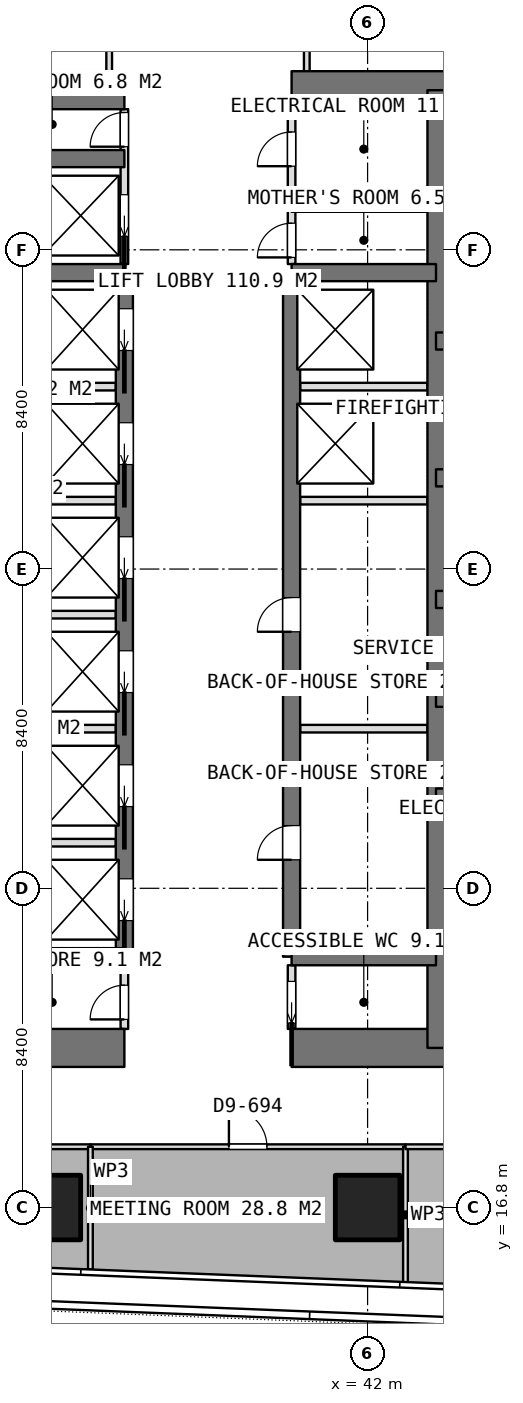
"""IFC4 building model, lengths in metres.
Left out: names, types, materials, properties, quantities, classifications, styles, units other than length and angle.
Written with IfcOpenShell. Run it as: python <this file> out.ifc"""

import sys

from ifc_helpers import new_model, si_unit, direction, frame, frame_2d, origin, origin_2d, place, context, subcontext, project, spatial, rectangle, extrude, element, fill, save


model = new_model("IFC4")
c1 = context("Model", 3, precision=1e-05, world=origin(), true_north=direction((0.0, 1.0)))
c2 = subcontext(c1, "Body", "Model", "MODEL_VIEW")
j1 = project(units=[si_unit("LENGTHUNIT", "METRE"), si_unit("PLANEANGLEUNIT", "RADIAN")], contexts=[c1])
p1 = place(None, origin())
s1 = spatial("IfcSite", under=j1, at=p1, CompositionType="ELEMENT")
p2 = place(p1, origin())
s2 = spatial("IfcBuilding", under=s1, at=p2, CompositionType="ELEMENT")
p3 = place(p2, frame((0.0, 0.0, 180.2)))
s3 = spatial("IfcBuildingStorey", under=s2, at=p3, CompositionType="ELEMENT", Elevation=180.2)
p4 = place(p3, frame((25.2, 21.0, 0.0), z_axis=(0.0, 0.0, 1.0), x_axis=(1.0, 0.0, 0.0)))
e1 = element("IfcWall", 1, at=p4, inside=s3, PredefinedType="SHEAR", context=c2, shape_type="SweptSolid", body=[
    extrude(rectangle(XDim=10.4, YDim=1.0, at=frame_2d((5.2, 0.0))), origin(), (0.0, 0.0, 1.0), 3.75),
])
p5 = place(p3, frame((40.0, 21.0, 0.0), z_axis=(0.0, 0.0, 1.0), x_axis=(1.0, 0.0, 0.0)))
e2 = element("IfcWall", 2, at=p5, inside=s3, PredefinedType="SHEAR", context=c2, shape_type="SweptSolid", body=[
    extrude(rectangle(XDim=10.4, YDim=1.0, at=frame_2d((5.2, 0.0))), origin(), (0.0, 0.0, 1.0), 3.75),
])
p6 = place(p3, frame((25.2, 46.2, 0.0), z_axis=(0.0, 0.0, 1.0), x_axis=(1.0, 0.0, 0.0)))
e3 = element("IfcWall", 3, at=p6, inside=s3, PredefinedType="SHEAR", context=c2, shape_type="SweptSolid", body=[
    extrude(rectangle(XDim=10.4, YDim=1.0, at=frame_2d((5.2, 0.0))), origin(), (0.0, 0.0, 1.0), 3.75),
])
p7 = place(p3, frame((40.0, 46.2, 0.0), z_axis=(0.0, 0.0, 1.0), x_axis=(1.0, 0.0, 0.0)))
e4 = element("IfcWall", 4, at=p7, inside=s3, PredefinedType="SHEAR", context=c2, shape_type="SweptSolid", body=[
    extrude(rectangle(XDim=10.4, YDim=1.0, at=frame_2d((5.2, 0.0))), origin(), (0.0, 0.0, 1.0), 3.75),
])
p8 = place(p3, frame((43.8, 21.0, 0.0), z_axis=(0.0, 0.0, 1.0), x_axis=(0.0, 1.0, 0.0)))
e5 = element("IfcWall", 5, at=p8, inside=s3, PredefinedType="SHEAR", context=c2, shape_type="SweptSolid", body=[
    extrude(rectangle(XDim=25.2, YDim=0.45, at=frame_2d((12.6, 0.0))), origin(), (0.0, 0.0, 1.0), 3.75),
])
p9 = place(p3, frame((35.6, 23.4, 0.0), z_axis=(0.0, 0.0, 1.0), x_axis=(0.0, 1.0, 0.0)))
e6 = element("IfcWall", 6, at=p9, inside=s3, PredefinedType="SHEAR", context=c2, shape_type="SweptSolid", body=[
    extrude(rectangle(XDim=18.0, YDim=0.45, at=frame_2d((9.0, 0.0))), origin(), (0.0, 0.0, 1.0), 3.75),
])
p10 = place(p9, frame((0.95, 0.0, 0.0)))
e7 = element("IfcOpeningElement", 7, at=p10, cuts=e6, PredefinedType="OPENING", context=c2, shape_type="SweptSolid", body=[
    extrude(rectangle(XDim=1.1, YDim=2.1, at=frame_2d((0.55, 1.05))), frame((0.0, 0.235, 0.0), z_axis=(0.0, -1.0, 0.0), x_axis=(1.0, 0.0, 0.0)), (0.0, 0.0, 1.0), 0.47),
])
p11 = place(p9, frame((3.95, 0.0, 0.0)))
e8 = element("IfcOpeningElement", 8, at=p11, cuts=e6, PredefinedType="OPENING", context=c2, shape_type="SweptSolid", body=[
    extrude(rectangle(XDim=1.1, YDim=2.1, at=frame_2d((0.55, 1.05))), frame((0.0, 0.235, 0.0), z_axis=(0.0, -1.0, 0.0), x_axis=(1.0, 0.0, 0.0)), (0.0, 0.0, 1.0), 0.47),
])
p12 = place(p9, frame((6.95, 0.0, 0.0)))
e9 = element("IfcOpeningElement", 9, at=p12, cuts=e6, PredefinedType="OPENING", context=c2, shape_type="SweptSolid", body=[
    extrude(rectangle(XDim=1.1, YDim=2.1, at=frame_2d((0.55, 1.05))), frame((0.0, 0.235, 0.0), z_axis=(0.0, -1.0, 0.0), x_axis=(1.0, 0.0, 0.0)), (0.0, 0.0, 1.0), 0.47),
])
p13 = place(p9, frame((9.95, 0.0, 0.0)))
e10 = element("IfcOpeningElement", 10, at=p13, cuts=e6, PredefinedType="OPENING", context=c2, shape_type="SweptSolid", body=[
    extrude(rectangle(XDim=1.1, YDim=2.1, at=frame_2d((0.55, 1.05))), frame((0.0, 0.235, 0.0), z_axis=(0.0, -1.0, 0.0), x_axis=(1.0, 0.0, 0.0)), (0.0, 0.0, 1.0), 0.47),
])
p14 = place(p9, frame((12.95, 0.0, 0.0)))
e11 = element("IfcOpeningElement", 11, at=p14, cuts=e6, PredefinedType="OPENING", context=c2, shape_type="SweptSolid", body=[
    extrude(rectangle(XDim=1.1, YDim=2.1, at=frame_2d((0.55, 1.05))), frame((0.0, 0.235, 0.0), z_axis=(0.0, -1.0, 0.0), x_axis=(1.0, 0.0, 0.0)), (0.0, 0.0, 1.0), 0.47),
])
p15 = place(p9, frame((15.95, 0.0, 0.0)))
e12 = element("IfcOpeningElement", 12, at=p15, cuts=e6, PredefinedType="OPENING", context=c2, shape_type="SweptSolid", body=[
    extrude(rectangle(XDim=1.1, YDim=2.1, at=frame_2d((0.55, 1.05))), frame((0.0, 0.235, 0.0), z_axis=(0.0, -1.0, 0.0), x_axis=(1.0, 0.0, 0.0)), (0.0, 0.0, 1.0), 0.47),
])
p16 = place(p3, frame((40.0, 23.4, 0.0), z_axis=(0.0, 0.0, 1.0), x_axis=(0.0, 1.0, 0.0)))
e13 = element("IfcWall", 13, at=p16, inside=s3, PredefinedType="SHEAR", context=c2, shape_type="SweptSolid", body=[
    extrude(rectangle(XDim=18.0, YDim=0.45, at=frame_2d((9.0, 0.0))), origin(), (0.0, 0.0, 1.0), 3.75),
])
p17 = place(p16, frame((2.55, 0.0, 0.0)))
e14 = element("IfcOpeningElement", 14, at=p17, cuts=e13, PredefinedType="OPENING", context=c2, shape_type="SweptSolid", body=[
    extrude(rectangle(XDim=0.9, YDim=2.1, at=frame_2d((0.45, 1.05))), frame((0.0, 0.235, 0.0), z_axis=(0.0, -1.0, 0.0), x_axis=(1.0, 0.0, 0.0)), (0.0, 0.0, 1.0), 0.47),
])
p18 = place(p16, frame((8.55, 0.0, 0.0)))
e15 = element("IfcOpeningElement", 15, at=p18, cuts=e13, PredefinedType="OPENING", context=c2, shape_type="SweptSolid", body=[
    extrude(rectangle(XDim=0.9, YDim=2.1, at=frame_2d((0.45, 1.05))), frame((0.0, 0.235, 0.0), z_axis=(0.0, -1.0, 0.0), x_axis=(1.0, 0.0, 0.0)), (0.0, 0.0, 1.0), 0.47),
])
for number, where, z_axis, x_axis in (
    (16, (31.8, 23.4, 0.0), (0.0, 0.0, 1.0), (1.0, 0.0, 0.0)),
    (17, (31.8, 41.4, 0.0), (0.0, 0.0, 1.0), (1.0, 0.0, 0.0)),
    (18, (31.8, 44.4, 0.0), (0.0, 0.0, 1.0), (1.0, 0.0, 0.0)),
    (19, (40.0, 23.4, 0.0), (0.0, 0.0, 1.0), (1.0, 0.0, 0.0)),
    (20, (40.0, 41.4, 0.0), (0.0, 0.0, 1.0), (1.0, 0.0, 0.0)),
):
    element("IfcWall", number, at=place(p3, frame(where, z_axis=z_axis, x_axis=x_axis)), inside=s3, PredefinedType="SHEAR", context=c2, shape_type="SweptSolid", body=[
        extrude(rectangle(XDim=3.8, YDim=0.45, at=frame_2d((1.9, 0.0))), origin(), (0.0, 0.0, 1.0), 3.75),
    ])
for number, where, z_axis, x_axis in (
    (21, (43.8, 27.6, 0.0), (0.0, 0.0, 1.0), (1.0, 0.0, 0.0)),
    (22, (43.8, 30.2, 0.0), (0.0, 0.0, 1.0), (1.0, 0.0, 0.0)),
    (23, (43.8, 32.8, 0.0), (0.0, 0.0, 1.0), (1.0, 0.0, 0.0)),
):
    element("IfcWall", number, at=place(p3, frame(where, z_axis=z_axis, x_axis=x_axis)), inside=s3, PredefinedType="SHEAR", context=c2, shape_type="SweptSolid", body=[
        extrude(rectangle(XDim=6.6, YDim=0.45, at=frame_2d((3.3, 0.0))), origin(), (0.0, 0.0, 1.0), 3.75),
    ])
p19 = place(p3, frame((43.8, 36.0, 0.0), z_axis=(0.0, 0.0, 1.0), x_axis=(1.0, 0.0, 0.0)))
e24 = element("IfcWall", 24, at=p19, inside=s3, PredefinedType="SHEAR", context=c2, shape_type="SweptSolid", body=[
    extrude(rectangle(XDim=6.6, YDim=0.45, at=frame_2d((3.3, 0.0))), origin(), (0.0, 0.0, 1.0), 3.75),
])
p20 = place(p19, frame((2.65, 0.0, 0.0)))
e25 = element("IfcOpeningElement", 25, at=p20, cuts=e24, PredefinedType="OPENING", context=c2, shape_type="SweptSolid", body=[
    extrude(rectangle(XDim=1.3, YDim=2.1, at=frame_2d((0.65, 1.05))), frame((0.0, 0.235, 0.0), z_axis=(0.0, -1.0, 0.0), x_axis=(1.0, 0.0, 0.0)), (0.0, 0.0, 1.0), 0.47),
])
p21 = place(p3, frame((43.8, 39.6, 0.0), z_axis=(0.0, 0.0, 1.0), x_axis=(1.0, 0.0, 0.0)))
e26 = element("IfcWall", 26, at=p21, inside=s3, PredefinedType="SHEAR", context=c2, shape_type="SweptSolid", body=[
    extrude(rectangle(XDim=6.6, YDim=0.45, at=frame_2d((3.3, 0.0))), origin(), (0.0, 0.0, 1.0), 3.75),
])
p22 = place(p21, frame((0.425, 0.0, 0.0)))
e27 = element("IfcOpeningElement", 27, at=p22, cuts=e26, PredefinedType="OPENING", context=c2, shape_type="SweptSolid", body=[
    extrude(rectangle(XDim=1.2, YDim=2.1, at=frame_2d((0.6, 1.05))), frame((0.0, 0.235, 0.0), z_axis=(0.0, -1.0, 0.0), x_axis=(1.0, 0.0, 0.0)), (0.0, 0.0, 1.0), 0.47),
])
for number, where, z_axis, x_axis in (
    (28, (33.6, 16.8, 0.0), (0.0, 0.0, 1.0), (1.0, 0.0, 0.0)),
    (29, (42.0, 16.8, 0.0), (0.0, 0.0, 1.0), (1.0, 0.0, 0.0)),
):
    element("IfcColumn", number, at=place(p3, frame(where, z_axis=z_axis, x_axis=x_axis)), inside=s3, PredefinedType="COLUMN", context=c2, shape_type="SweptSolid", body=[
        extrude(rectangle(XDim=1.7, YDim=1.7, at=origin_2d()), origin(), (0.0, 0.0, 1.0), 3.75),
    ])
for number, where, z_axis, x_axis in (
    (30, (32.025, 26.4, 0.0), (0.0, 0.0, 1.0), (1.0, 0.0, 0.0)),
    (31, (32.025, 29.4, 0.0), (0.0, 0.0, 1.0), (1.0, 0.0, 0.0)),
    (32, (32.025, 32.4, 0.0), (0.0, 0.0, 1.0), (1.0, 0.0, 0.0)),
    (33, (32.025, 35.4, 0.0), (0.0, 0.0, 1.0), (1.0, 0.0, 0.0)),
    (34, (32.025, 38.4, 0.0), (0.0, 0.0, 1.0), (1.0, 0.0, 0.0)),
):
    element("IfcWall", number, at=place(p3, frame(where, z_axis=z_axis, x_axis=x_axis)), inside=s3, PredefinedType="PARTITIONING", context=c2, shape_type="SweptSolid", body=[
        extrude(rectangle(XDim=3.35, YDim=0.2, at=frame_2d((1.675, 0.0))), origin(), (0.0, 0.0, 1.0), 3.5),
    ])
for number, where, z_axis, x_axis in (
    (35, (40.225, 29.4, 0.0), (0.0, 0.0, 1.0), (1.0, 0.0, 0.0)),
    (36, (40.225, 35.4, 0.0), (0.0, 0.0, 1.0), (1.0, 0.0, 0.0)),
    (37, (40.225, 38.4, 0.0), (0.0, 0.0, 1.0), (1.0, 0.0, 0.0)),
):
    element("IfcWall", number, at=place(p3, frame(where, z_axis=z_axis, x_axis=x_axis)), inside=s3, PredefinedType="PARTITIONING", context=c2, shape_type="SweptSolid", body=[
        extrude(rectangle(XDim=3.35, YDim=0.2, at=frame_2d((1.675, 0.0))), origin(), (0.0, 0.0, 1.0), 3.5),
    ])
p23 = place(p3, frame((40.0, 21.5, 0.0), z_axis=(0.0, 0.0, 1.0), x_axis=(0.0, 1.0, 0.0)))
e38 = element("IfcWall", 38, at=p23, inside=s3, PredefinedType="PARTITIONING", context=c2, shape_type="SweptSolid", body=[
    extrude(rectangle(XDim=1.675, YDim=0.2, at=frame_2d((0.837, 0.0))), origin(), (0.0, 0.0, 1.0), 3.5),
])
p24 = place(p23, frame((0.15, 0.0, 0.0)))
e39 = element("IfcOpeningElement", 39, at=p24, cuts=e38, PredefinedType="OPENING", context=c2, shape_type="SweptSolid", body=[
    extrude(rectangle(XDim=1.1, YDim=2.1, at=frame_2d((0.55, 1.05))), frame((0.0, 0.11, 0.0), z_axis=(0.0, -1.0, 0.0), x_axis=(1.0, 0.0, 0.0)), (0.0, 0.0, 1.0), 0.22),
])
p25 = place(p3, frame((40.0, 41.625, 0.0), z_axis=(0.0, 0.0, 1.0), x_axis=(0.0, 1.0, 0.0)))
e40 = element("IfcWall", 40, at=p25, inside=s3, PredefinedType="PARTITIONING", context=c2, shape_type="SweptSolid", body=[
    extrude(rectangle(XDim=4.075, YDim=0.2, at=frame_2d((2.038, 0.0))), origin(), (0.0, 0.0, 1.0), 3.5),
])
p26 = place(p25, frame((2.575, 0.0, 0.0)))
e41 = element("IfcOpeningElement", 41, at=p26, cuts=e40, PredefinedType="OPENING", context=c2, shape_type="SweptSolid", body=[
    extrude(rectangle(XDim=0.9, YDim=2.1, at=frame_2d((0.45, 1.05))), frame((0.0, 0.11, 0.0), z_axis=(0.0, -1.0, 0.0), x_axis=(1.0, 0.0, 0.0)), (0.0, 0.0, 1.0), 0.22),
])
p27 = place(p25, frame((0.175, 0.0, 0.0)))
e42 = element("IfcOpeningElement", 42, at=p27, cuts=e40, PredefinedType="OPENING", context=c2, shape_type="SweptSolid", body=[
    extrude(rectangle(XDim=0.9, YDim=2.1, at=frame_2d((0.45, 1.05))), frame((0.0, 0.11, 0.0), z_axis=(0.0, -1.0, 0.0), x_axis=(1.0, 0.0, 0.0)), (0.0, 0.0, 1.0), 0.22),
])
p28 = place(p3, frame((35.6, 41.625, 0.0), z_axis=(0.0, 0.0, 1.0), x_axis=(0.0, 1.0, 0.0)))
e43 = element("IfcWall", 43, at=p28, inside=s3, PredefinedType="PARTITIONING", context=c2, shape_type="SweptSolid", body=[
    extrude(rectangle(XDim=4.075, YDim=0.2, at=frame_2d((2.038, 0.0))), origin(), (0.0, 0.0, 1.0), 3.5),
])
p29 = place(p28, frame((3.088, 0.0, 0.0)))
e44 = element("IfcOpeningElement", 44, at=p29, cuts=e43, PredefinedType="OPENING", context=c2, shape_type="SweptSolid", body=[
    extrude(rectangle(XDim=0.9, YDim=2.1, at=frame_2d((0.45, 1.05))), frame((0.0, 0.11, 0.0), z_axis=(0.0, -1.0, 0.0), x_axis=(1.0, 0.0, 0.0)), (0.0, 0.0, 1.0), 0.22),
])
p30 = place(p28, frame((0.725, 0.0, 0.0)))
e45 = element("IfcOpeningElement", 45, at=p30, cuts=e43, PredefinedType="OPENING", context=c2, shape_type="SweptSolid", body=[
    extrude(rectangle(XDim=1.1, YDim=2.1, at=frame_2d((0.55, 1.05))), frame((0.0, 0.11, 0.0), z_axis=(0.0, -1.0, 0.0), x_axis=(1.0, 0.0, 0.0)), (0.0, 0.0, 1.0), 0.22),
])
p31 = place(p3, frame((35.6, 21.5, 0.0), z_axis=(0.0, 0.0, 1.0), x_axis=(0.0, 1.0, 0.0)))
e46 = element("IfcWall", 46, at=p31, inside=s3, PredefinedType="PARTITIONING", context=c2, shape_type="SweptSolid", body=[
    extrude(rectangle(XDim=1.675, YDim=0.2, at=frame_2d((0.837, 0.0))), origin(), (0.0, 0.0, 1.0), 3.5),
])
p32 = place(p31, frame((0.25, 0.0, 0.0)))
e47 = element("IfcOpeningElement", 47, at=p32, cuts=e46, PredefinedType="OPENING", context=c2, shape_type="SweptSolid", body=[
    extrude(rectangle(XDim=0.9, YDim=2.1, at=frame_2d((0.45, 1.05))), frame((0.0, 0.11, 0.0), z_axis=(0.0, -1.0, 0.0), x_axis=(1.0, 0.0, 0.0)), (0.0, 0.0, 1.0), 0.22),
])
p33 = place(p3, frame((40.0, 43.1, 0.0), z_axis=(0.0, 0.0, 1.0), x_axis=(1.0, 0.0, 0.0)))
e48 = element("IfcWall", 48, at=p33, inside=s3, PredefinedType="PARTITIONING", context=c2, shape_type="SweptSolid", body=[
    extrude(rectangle(XDim=3.575, YDim=0.2, at=frame_2d((1.788, 0.0))), origin(), (0.0, 0.0, 1.0), 3.5),
])
for number, where, z_axis, x_axis in (
    (49, (40.4, 46.7, 0.0), (0.0, 0.0, 1.0), (0.0, 1.0, 0.0)),
    (50, (35.2, 46.7, 0.0), (0.0, 0.0, 1.0), (0.0, 1.0, 0.0)),
):
    element("IfcWall", number, at=place(p3, frame(where, z_axis=z_axis, x_axis=x_axis)), inside=s3, PredefinedType="PARTITIONING", context=c2, shape_type="SweptSolid", body=[
        extrude(rectangle(XDim=2.625, YDim=0.15, at=frame_2d((1.312, 0.0))), origin(), (0.0, 0.0, 1.0), 3.5),
    ])
p34 = place(p3, frame((34.706, 18.4, 0.0), z_axis=(0.0, 0.0, 1.0), x_axis=(1.0, 0.0, 0.0)))
e51 = element("IfcWall", 51, at=p34, inside=s3, PredefinedType="PARTITIONING", context=c2, shape_type="SweptSolid", body=[
    extrude(rectangle(XDim=8.291, YDim=0.125, at=frame_2d((4.146, 0.0))), origin(), (0.0, 0.0, 1.0), 3.5),
])
p35 = place(p34, frame((3.645, 0.0, 0.0)))
e52 = element("IfcOpeningElement", 52, at=p35, cuts=e51, PredefinedType="OPENING", context=c2, shape_type="SweptSolid", body=[
    extrude(rectangle(XDim=1.0, YDim=2.1, at=frame_2d((0.5, 1.05))), frame((0.0, 0.073, 0.0), z_axis=(0.0, -1.0, 0.0), x_axis=(1.0, 0.0, 0.0)), (0.0, 0.0, 1.0), 0.145),
])
p36 = place(p3, frame((42.997, 18.4, 0.0), z_axis=(0.0, 0.0, 1.0), x_axis=(0.0, -1.0, 0.0)))
e53 = element("IfcWall", 53, at=p36, inside=s3, PredefinedType="PARTITIONING", context=c2, shape_type="SweptSolid", body=[
    extrude(rectangle(XDim=3.586, YDim=0.125, at=frame_2d((1.793, 0.0))), origin(), (0.0, 0.0, 1.0), 3.5),
])
p37 = place(p3, frame((34.706, 15.175, 0.0), z_axis=(0.0, 0.0, 1.0), x_axis=(0.0, 1.0, 0.0)))
e54 = element("IfcWall", 54, at=p37, inside=s3, PredefinedType="PARTITIONING", context=c2, shape_type="SweptSolid", body=[
    extrude(rectangle(XDim=3.225, YDim=0.125, at=frame_2d((1.612, 0.0))), origin(), (0.0, 0.0, 1.0), 3.5),
])
p38 = place(p3, frame((42.998, 18.4, 0.0), z_axis=(0.0, 0.0, 1.0), x_axis=(1.0, 0.0, 0.0)))
e55 = element("IfcWall", 55, at=p38, inside=s3, PredefinedType="PARTITIONING", context=c2, shape_type="SweptSolid", body=[
    extrude(rectangle(XDim=8.466, YDim=0.125, at=frame_2d((4.233, 0.0))), origin(), (0.0, 0.0, 1.0), 3.5),
])
p39 = place(p38, frame((3.733, 0.0, 0.0)))
e56 = element("IfcOpeningElement", 56, at=p39, cuts=e55, PredefinedType="OPENING", context=c2, shape_type="SweptSolid", body=[
    extrude(rectangle(XDim=1.0, YDim=2.1, at=frame_2d((0.5, 1.05))), frame((0.0, 0.073, 0.0), z_axis=(0.0, -1.0, 0.0), x_axis=(1.0, 0.0, 0.0)), (0.0, 0.0, 1.0), 0.145),
])
p40 = place(p3, frame((26.233, 18.4, 0.0), z_axis=(0.0, 0.0, 1.0), x_axis=(1.0, 0.0, 0.0)))
e57 = element("IfcWall", 57, at=p40, inside=s3, PredefinedType="PARTITIONING", context=c2, shape_type="SweptSolid", body=[
    extrude(rectangle(XDim=8.472, YDim=0.125, at=frame_2d((4.236, 0.0))), origin(), (0.0, 0.0, 1.0), 3.5),
])
p41 = place(p40, frame((3.736, 0.0, 0.0)))
e58 = element("IfcOpeningElement", 58, at=p41, cuts=e57, PredefinedType="OPENING", context=c2, shape_type="SweptSolid", body=[
    extrude(rectangle(XDim=1.0, YDim=2.1, at=frame_2d((0.5, 1.05))), frame((0.0, 0.073, 0.0), z_axis=(0.0, -1.0, 0.0), x_axis=(1.0, 0.0, 0.0)), (0.0, 0.0, 1.0), 0.145),
])
p42 = place(p24, origin())
e59 = element("IfcDoor", 59, at=p42, inside=s3, OperationType="SLIDING_TO_LEFT", PredefinedType="DOOR", context=c2, shape_type="SweptSolid", body=[
    extrude(rectangle(XDim=1.1, YDim=2.1, at=frame_2d((0.55, 1.05))), frame((0.0, 0.025, 0.0), z_axis=(0.0, -1.0, 0.0), x_axis=(1.0, 0.0, 0.0)), (0.0, 0.0, 1.0), 0.05),
])
fill(e39, e59)
p43 = place(p32, origin())
e60 = element("IfcDoor", 60, at=p43, inside=s3, OperationType="SINGLE_SWING_LEFT", PredefinedType="DOOR", context=c2, shape_type="SweptSolid", body=[
    extrude(rectangle(XDim=0.9, YDim=2.1, at=frame_2d((0.45, 1.05))), frame((0.0, 0.025, 0.0), z_axis=(0.0, -1.0, 0.0), x_axis=(1.0, 0.0, 0.0)), (0.0, 0.0, 1.0), 0.05),
])
fill(e47, e60)
p44 = place(p26, origin())
e61 = element("IfcDoor", 61, at=p44, inside=s3, OperationType="SINGLE_SWING_LEFT", PredefinedType="DOOR", context=c2, shape_type="SweptSolid", body=[
    extrude(rectangle(XDim=0.9, YDim=2.1, at=frame_2d((0.45, 1.05))), frame((0.0, 0.025, 0.0), z_axis=(0.0, -1.0, 0.0), x_axis=(1.0, 0.0, 0.0)), (0.0, 0.0, 1.0), 0.05),
])
fill(e41, e61)
p45 = place(p27, origin())
e62 = element("IfcDoor", 62, at=p45, inside=s3, OperationType="SINGLE_SWING_LEFT", PredefinedType="DOOR", context=c2, shape_type="SweptSolid", body=[
    extrude(rectangle(XDim=0.9, YDim=2.1, at=frame_2d((0.45, 1.05))), frame((0.0, 0.025, 0.0), z_axis=(0.0, -1.0, 0.0), x_axis=(1.0, 0.0, 0.0)), (0.0, 0.0, 1.0), 0.05),
])
fill(e42, e62)
p46 = place(p17, origin())
e63 = element("IfcDoor", 63, at=p46, inside=s3, OperationType="SINGLE_SWING_LEFT", PredefinedType="DOOR", context=c2, shape_type="SweptSolid", body=[
    extrude(rectangle(XDim=0.9, YDim=2.1, at=frame_2d((0.45, 1.05))), frame((0.0, 0.025, 0.0), z_axis=(0.0, -1.0, 0.0), x_axis=(1.0, 0.0, 0.0)), (0.0, 0.0, 1.0), 0.05),
])
fill(e14, e63)
p47 = place(p18, origin())
e64 = element("IfcDoor", 64, at=p47, inside=s3, OperationType="SINGLE_SWING_LEFT", PredefinedType="DOOR", context=c2, shape_type="SweptSolid", body=[
    extrude(rectangle(XDim=0.9, YDim=2.1, at=frame_2d((0.45, 1.05))), frame((0.0, 0.025, 0.0), z_axis=(0.0, -1.0, 0.0), x_axis=(1.0, 0.0, 0.0)), (0.0, 0.0, 1.0), 0.05),
])
fill(e15, e64)
p48 = place(p29, origin())
e65 = element("IfcDoor", 65, at=p48, inside=s3, OperationType="SINGLE_SWING_LEFT", PredefinedType="DOOR", context=c2, shape_type="SweptSolid", body=[
    extrude(rectangle(XDim=0.9, YDim=2.1, at=frame_2d((0.45, 1.05))), frame((0.0, 0.025, 0.0), z_axis=(0.0, -1.0, 0.0), x_axis=(1.0, 0.0, 0.0)), (0.0, 0.0, 1.0), 0.05),
])
fill(e44, e65)
p49 = place(p10, origin())
e66 = element("IfcDoor", 66, at=p49, inside=s3, OperationType="SLIDING_TO_LEFT", PredefinedType="USERDEFINED", context=c2, shape_type="SweptSolid", body=[
    extrude(rectangle(XDim=1.1, YDim=2.1, at=frame_2d((0.55, 1.05))), frame((0.0, 0.025, 0.0), z_axis=(0.0, -1.0, 0.0), x_axis=(1.0, 0.0, 0.0)), (0.0, 0.0, 1.0), 0.05),
])
fill(e7, e66)
p50 = place(p11, origin())
e67 = element("IfcDoor", 67, at=p50, inside=s3, OperationType="SLIDING_TO_LEFT", PredefinedType="USERDEFINED", context=c2, shape_type="SweptSolid", body=[
    extrude(rectangle(XDim=1.1, YDim=2.1, at=frame_2d((0.55, 1.05))), frame((0.0, 0.025, 0.0), z_axis=(0.0, -1.0, 0.0), x_axis=(1.0, 0.0, 0.0)), (0.0, 0.0, 1.0), 0.05),
])
fill(e8, e67)
p51 = place(p12, origin())
e68 = element("IfcDoor", 68, at=p51, inside=s3, OperationType="SLIDING_TO_LEFT", PredefinedType="USERDEFINED", context=c2, shape_type="SweptSolid", body=[
    extrude(rectangle(XDim=1.1, YDim=2.1, at=frame_2d((0.55, 1.05))), frame((0.0, 0.025, 0.0), z_axis=(0.0, -1.0, 0.0), x_axis=(1.0, 0.0, 0.0)), (0.0, 0.0, 1.0), 0.05),
])
fill(e9, e68)
p52 = place(p13, origin())
e69 = element("IfcDoor", 69, at=p52, inside=s3, OperationType="SLIDING_TO_LEFT", PredefinedType="USERDEFINED", context=c2, shape_type="SweptSolid", body=[
    extrude(rectangle(XDim=1.1, YDim=2.1, at=frame_2d((0.55, 1.05))), frame((0.0, 0.025, 0.0), z_axis=(0.0, -1.0, 0.0), x_axis=(1.0, 0.0, 0.0)), (0.0, 0.0, 1.0), 0.05),
])
fill(e10, e69)
p53 = place(p14, origin())
e70 = element("IfcDoor", 70, at=p53, inside=s3, OperationType="SLIDING_TO_LEFT", PredefinedType="USERDEFINED", context=c2, shape_type="SweptSolid", body=[
    extrude(rectangle(XDim=1.1, YDim=2.1, at=frame_2d((0.55, 1.05))), frame((0.0, 0.025, 0.0), z_axis=(0.0, -1.0, 0.0), x_axis=(1.0, 0.0, 0.0)), (0.0, 0.0, 1.0), 0.05),
])
fill(e11, e70)
p54 = place(p15, origin())
e71 = element("IfcDoor", 71, at=p54, inside=s3, OperationType="SLIDING_TO_LEFT", PredefinedType="USERDEFINED", context=c2, shape_type="SweptSolid", body=[
    extrude(rectangle(XDim=1.1, YDim=2.1, at=frame_2d((0.55, 1.05))), frame((0.0, 0.025, 0.0), z_axis=(0.0, -1.0, 0.0), x_axis=(1.0, 0.0, 0.0)), (0.0, 0.0, 1.0), 0.05),
])
fill(e12, e71)
p55 = place(p30, origin())
e72 = element("IfcDoor", 72, at=p55, inside=s3, OperationType="SLIDING_TO_LEFT", PredefinedType="USERDEFINED", context=c2, shape_type="SweptSolid", body=[
    extrude(rectangle(XDim=1.1, YDim=2.1, at=frame_2d((0.55, 1.05))), frame((0.0, 0.025, 0.0), z_axis=(0.0, -1.0, 0.0), x_axis=(1.0, 0.0, 0.0)), (0.0, 0.0, 1.0), 0.05),
])
fill(e45, e72)
p56 = place(p35, origin())
e73 = element("IfcDoor", 73, at=p56, inside=s3, OperationType="SINGLE_SWING_LEFT", PredefinedType="DOOR", context=c2, shape_type="SweptSolid", body=[
    extrude(rectangle(XDim=1.0, YDim=2.1, at=frame_2d((0.5, 1.05))), frame((0.0, 0.025, 0.0), z_axis=(0.0, -1.0, 0.0), x_axis=(1.0, 0.0, 0.0)), (0.0, 0.0, 1.0), 0.05),
])
fill(e52, e73)
save(model, sys.argv[1])
